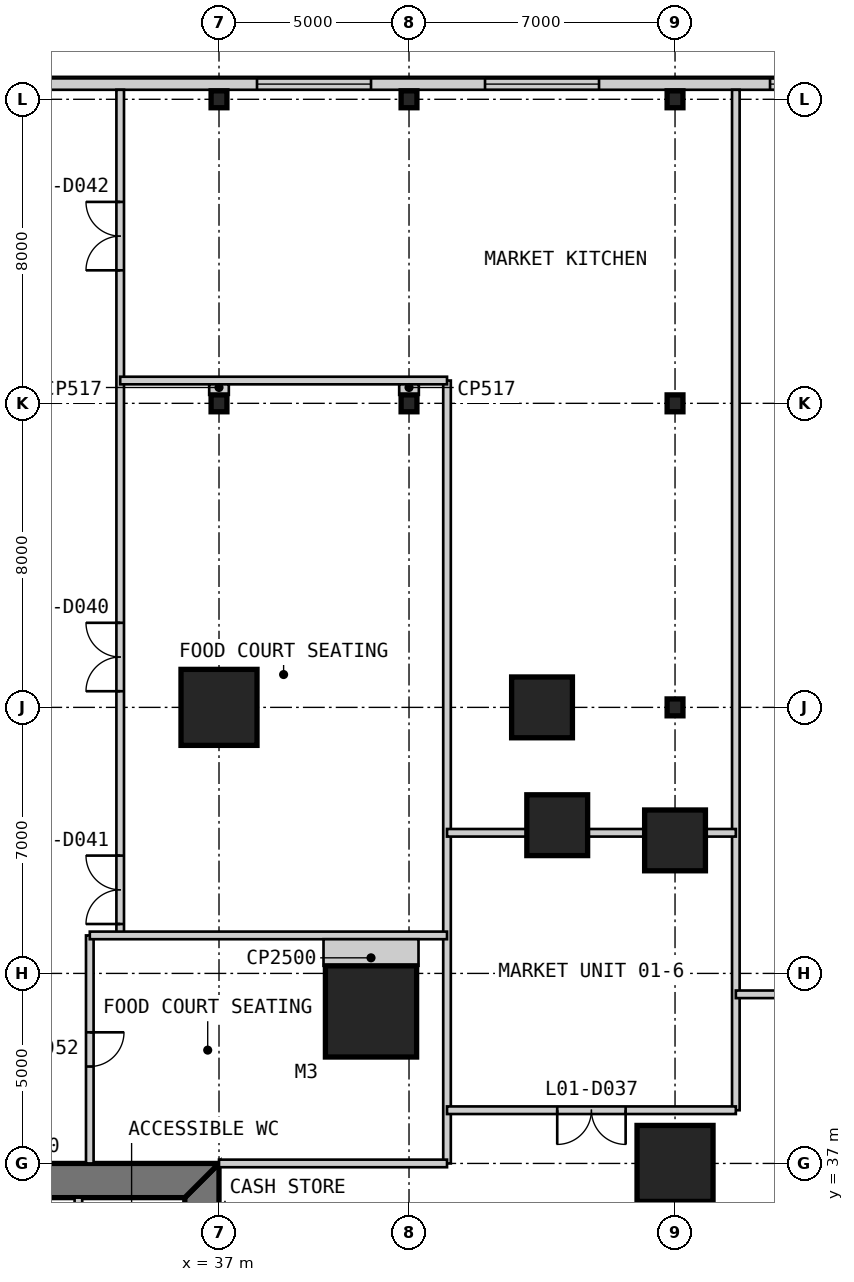
"""IFC4 building model, lengths in metres.
Left out: names, types, materials, properties, quantities, classifications, styles, units other than length and angle.
Written with IfcOpenShell. Run it as: python <this file> out.ifc"""

import sys

from ifc_helpers import new_model, si_unit, direction, frame, frame_2d, origin, origin_2d, place, context, subcontext, project, spatial, polyline, rectangle, i_section, outline, extrude, element, fill, save


model = new_model("IFC4")
c1 = context("Model", 3, precision=1e-05, world=origin(), true_north=direction((0.0, 1.0)))
c2 = subcontext(c1, "Body", "Model", "MODEL_VIEW")
j1 = project(units=[si_unit("LENGTHUNIT", "METRE"), si_unit("PLANEANGLEUNIT", "RADIAN")], contexts=[c1])
p1 = place(None, origin())
s1 = spatial("IfcSite", under=j1, at=p1, CompositionType="ELEMENT")
p2 = place(p1, origin())
s2 = spatial("IfcBuilding", under=s1, at=p2, CompositionType="ELEMENT")
p3 = place(p2, frame((0.0, 0.0, 7.0)))
s3 = spatial("IfcBuildingStorey", under=s2, at=p3, CompositionType="ELEMENT", Elevation=7.0)
p4 = place(p3, frame((41.0, 41.0, 0.0), z_axis=(0.0, 0.0, 1.0), x_axis=(1.0, 0.0, 0.0)))
e1 = element("IfcColumn", 1, at=p4, inside=s3, PredefinedType="COLUMN", context=c2, shape_type="SweptSolid", body=[
    extrude(rectangle(XDim=2.4, YDim=2.4, at=origin_2d()), origin(), (0.0, 0.0, 1.0), 4.8),
])
p5 = place(p3, frame((49.0, 37.0, 0.0), z_axis=(0.0, 0.0, 1.0), x_axis=(1.0, 0.0, 0.0)))
e2 = element("IfcColumn", 2, at=p5, inside=s3, PredefinedType="COLUMN", context=c2, shape_type="SweptSolid", body=[
    extrude(rectangle(XDim=2.0, YDim=2.0, at=origin_2d()), origin(), (0.0, 0.0, 1.0), 4.8),
])
for number, where, z_axis, x_axis in (
    (3, (49.0, 45.5, 0.0), (0.0, 0.0, 1.0), (1.0, 0.0, 0.0)),
    (4, (45.9, 45.9, 0.0), (0.0, 0.0, 1.0), (1.0, 0.0, 0.0)),
    (5, (45.5, 49.0, 0.0), (0.0, 0.0, 1.0), (1.0, 0.0, 0.0)),
):
    element("IfcColumn", number, at=place(p3, frame(where, z_axis=z_axis, x_axis=x_axis)), inside=s3, PredefinedType="COLUMN", context=c2, shape_type="SweptSolid", body=[
        extrude(rectangle(XDim=1.6, YDim=1.6, at=origin_2d()), origin(), (0.0, 0.0, 1.0), 4.8),
    ])
p6 = place(p3, frame((37.0, 49.0, 0.0), z_axis=(0.0, 0.0, 1.0), x_axis=(1.0, 0.0, 0.0)))
e6 = element("IfcColumn", 6, at=p6, inside=s3, PredefinedType="COLUMN", context=c2, shape_type="SweptSolid", body=[
    extrude(rectangle(XDim=2.0, YDim=2.0, at=origin_2d()), origin(), (0.0, 0.0, 1.0), 4.8),
])
for number, where, z_axis, x_axis in (
    (7, (37.0, 57.0, 0.0), (0.0, 0.0, 1.0), (1.0, 0.0, 0.0)),
    (8, (37.0, 65.0, 0.0), (0.0, 0.0, 1.0), (1.0, 0.0, 0.0)),
    (9, (42.0, 57.0, 0.0), (0.0, 0.0, 1.0), (1.0, 0.0, 0.0)),
    (10, (42.0, 65.0, 0.0), (0.0, 0.0, 1.0), (1.0, 0.0, 0.0)),
    (11, (49.0, 49.0, 0.0), (0.0, 0.0, 1.0), (1.0, 0.0, 0.0)),
    (12, (49.0, 57.0, 0.0), (0.0, 0.0, 1.0), (1.0, 0.0, 0.0)),
    (13, (49.0, 65.0, 0.0), (0.0, 0.0, 1.0), (1.0, 0.0, 0.0)),
):
    element("IfcColumn", number, at=place(p3, frame(where, z_axis=z_axis, x_axis=x_axis)), inside=s3, PredefinedType="COLUMN", context=c2, shape_type="SweptSolid", body=[
        extrude(i_section(OverallWidth=0.417, OverallDepth=0.445, WebThickness=0.039, FlangeThickness=0.063, at=origin_2d()), origin(), (0.0, 0.0, 1.0), 4.8),
    ])
p7 = place(p3, frame((36.55, 13.9, 0.0), z_axis=(0.0, 0.0, 1.0), x_axis=(0.0, 1.0, 0.0)))
e14 = element("IfcWall", 14, at=p7, inside=s3, PredefinedType="SHEAR", context=c2, shape_type="SweptSolid", body=[
    extrude(outline(polyline([(-0.9, -0.45), (23.1, -0.45), (22.2, 0.45), (0.0, 0.45), (-0.9, -0.45)])), origin(), (0.0, 0.0, 1.0), 4.8),
])
p8 = place(p7, frame((20.2, 0.0, 0.0)))
e15 = element("IfcOpeningElement", 15, at=p8, cuts=e14, PredefinedType="OPENING", context=c2, shape_type="SweptSolid", body=[
    extrude(rectangle(XDim=1.0, YDim=2.2, at=frame_2d((0.5, 1.1))), frame((0.0, 0.46, 0.0), z_axis=(0.0, -1.0, 0.0), x_axis=(1.0, 0.0, 0.0)), (0.0, 0.0, 1.0), 0.92),
])
p9 = place(p7, frame((17.25, 0.0, 0.0)))
e16 = element("IfcOpeningElement", 16, at=p9, cuts=e14, PredefinedType="OPENING", context=c2, shape_type="SweptSolid", body=[
    extrude(rectangle(XDim=0.9, YDim=2.2, at=frame_2d((0.45, 1.1))), frame((0.0, 0.46, 0.0), z_axis=(0.0, -1.0, 0.0), x_axis=(1.0, 0.0, 0.0)), (0.0, 0.0, 1.0), 0.92),
])
p10 = place(p3, frame((37.0, 36.55, 0.0), z_axis=(0.0, 0.0, 1.0), x_axis=(-1.0, 0.0, 0.0)))
e17 = element("IfcWall", 17, at=p10, inside=s3, PredefinedType="SHEAR", context=c2, shape_type="SweptSolid", body=[
    extrude(outline(polyline([(0.0, -0.45), (24.0, -0.45), (23.1, 0.45), (0.9, 0.45), (0.0, -0.45)])), origin(), (0.0, 0.0, 1.0), 4.8),
])
p11 = place(p10, frame((4.9, 0.0, 0.0)))
e18 = element("IfcOpeningElement", 18, at=p11, cuts=e17, PredefinedType="OPENING", context=c2, shape_type="SweptSolid", body=[
    extrude(rectangle(XDim=1.0, YDim=2.2, at=frame_2d((0.5, 1.1))), frame((0.0, 0.46, 0.0), z_axis=(0.0, -1.0, 0.0), x_axis=(1.0, 0.0, 0.0)), (0.0, 0.0, 1.0), 0.92),
])
p12 = place(p10, frame((8.9, 0.0, 0.0)))
e19 = element("IfcOpeningElement", 19, at=p12, cuts=e17, PredefinedType="OPENING", context=c2, shape_type="SweptSolid", body=[
    extrude(rectangle(XDim=1.1, YDim=2.2, at=frame_2d((0.55, 1.1))), frame((0.0, 0.46, 0.0), z_axis=(0.0, -1.0, 0.0), x_axis=(1.0, 0.0, 0.0)), (0.0, 0.0, 1.0), 0.92),
])
p13 = place(p10, frame((15.05, 0.0, 0.0)))
e20 = element("IfcOpeningElement", 20, at=p13, cuts=e17, PredefinedType="OPENING", context=c2, shape_type="SweptSolid", body=[
    extrude(rectangle(XDim=0.9, YDim=2.2, at=frame_2d((0.45, 1.1))), frame((0.0, 0.46, 0.0), z_axis=(0.0, -1.0, 0.0), x_axis=(1.0, 0.0, 0.0)), (0.0, 0.0, 1.0), 0.92),
])
p14 = place(p10, frame((17.9, 0.0, 0.0)))
e21 = element("IfcOpeningElement", 21, at=p14, cuts=e17, PredefinedType="OPENING", context=c2, shape_type="SweptSolid", body=[
    extrude(rectangle(XDim=1.0, YDim=2.2, at=frame_2d((0.5, 1.1))), frame((0.0, 0.46, 0.0), z_axis=(0.0, -1.0, 0.0), x_axis=(1.0, 0.0, 0.0)), (0.0, 0.0, 1.0), 0.92),
])
p15 = place(p10, frame((21.4, 0.0, 0.0)))
e22 = element("IfcOpeningElement", 22, at=p15, cuts=e17, PredefinedType="OPENING", context=c2, shape_type="SweptSolid", body=[
    extrude(rectangle(XDim=1.0, YDim=2.2, at=frame_2d((0.5, 1.1))), frame((0.0, 0.46, 0.0), z_axis=(0.0, -1.0, 0.0), x_axis=(1.0, 0.0, 0.0)), (0.0, 0.0, 1.0), 0.92),
])
p16 = place(p3, frame((65.55, 65.4, 0.0), z_axis=(0.0, 0.0, 1.0), x_axis=(-1.0, 0.0, 0.0)))
e23 = element("IfcWall", 23, at=p16, inside=s3, PredefinedType="SOLIDWALL", context=c2, shape_type="SweptSolid", body=[
    extrude(rectangle(XDim=81.1, YDim=0.3, at=frame_2d((40.55, 0.0))), origin(), (0.0, 0.0, 1.0), 4.5),
])
p17 = place(p16, frame((75.05, 0.0, 0.9)))
e24 = element("IfcOpeningElement", 24, at=p17, cuts=e23, PredefinedType="OPENING", context=c2, shape_type="SweptSolid", body=[
    extrude(rectangle(XDim=3.0, YDim=2.4, at=frame_2d((1.5, 1.2))), frame((0.0, 0.16, 0.0), z_axis=(0.0, -1.0, 0.0), x_axis=(1.0, 0.0, 0.0)), (0.0, 0.0, 1.0), 0.32),
])
p18 = place(p16, frame((67.05, 0.0, 0.9)))
e25 = element("IfcOpeningElement", 25, at=p18, cuts=e23, PredefinedType="OPENING", context=c2, shape_type="SweptSolid", body=[
    extrude(rectangle(XDim=3.0, YDim=2.4, at=frame_2d((1.5, 1.2))), frame((0.0, 0.16, 0.0), z_axis=(0.0, -1.0, 0.0), x_axis=(1.0, 0.0, 0.0)), (0.0, 0.0, 1.0), 0.32),
])
p19 = place(p16, frame((59.05, 0.0, 0.9)))
e26 = element("IfcOpeningElement", 26, at=p19, cuts=e23, PredefinedType="OPENING", context=c2, shape_type="SweptSolid", body=[
    extrude(rectangle(XDim=3.0, YDim=2.4, at=frame_2d((1.5, 1.2))), frame((0.0, 0.16, 0.0), z_axis=(0.0, -1.0, 0.0), x_axis=(1.0, 0.0, 0.0)), (0.0, 0.0, 1.0), 0.32),
])
p20 = place(p16, frame((45.05, 0.0, 0.9)))
e27 = element("IfcOpeningElement", 27, at=p20, cuts=e23, PredefinedType="OPENING", context=c2, shape_type="SweptSolid", body=[
    extrude(rectangle(XDim=3.0, YDim=2.4, at=frame_2d((1.5, 1.2))), frame((0.0, 0.16, 0.0), z_axis=(0.0, -1.0, 0.0), x_axis=(1.0, 0.0, 0.0)), (0.0, 0.0, 1.0), 0.32),
])
p21 = place(p16, frame((33.05, 0.0, 0.9)))
e28 = element("IfcOpeningElement", 28, at=p21, cuts=e23, PredefinedType="OPENING", context=c2, shape_type="SweptSolid", body=[
    extrude(rectangle(XDim=3.0, YDim=2.4, at=frame_2d((1.5, 1.2))), frame((0.0, 0.16, 0.0), z_axis=(0.0, -1.0, 0.0), x_axis=(1.0, 0.0, 0.0)), (0.0, 0.0, 1.0), 0.32),
])
p22 = place(p16, frame((24.55, 0.0, 0.9)))
e29 = element("IfcOpeningElement", 29, at=p22, cuts=e23, PredefinedType="OPENING", context=c2, shape_type="SweptSolid", body=[
    extrude(rectangle(XDim=3.0, YDim=2.4, at=frame_2d((1.5, 1.2))), frame((0.0, 0.16, 0.0), z_axis=(0.0, -1.0, 0.0), x_axis=(1.0, 0.0, 0.0)), (0.0, 0.0, 1.0), 0.32),
])
p23 = place(p16, frame((18.55, 0.0, 0.9)))
e30 = element("IfcOpeningElement", 30, at=p23, cuts=e23, PredefinedType="OPENING", context=c2, shape_type="SweptSolid", body=[
    extrude(rectangle(XDim=3.0, YDim=2.4, at=frame_2d((1.5, 1.2))), frame((0.0, 0.16, 0.0), z_axis=(0.0, -1.0, 0.0), x_axis=(1.0, 0.0, 0.0)), (0.0, 0.0, 1.0), 0.32),
])
p24 = place(p16, frame((11.05, 0.0, 0.9)))
e31 = element("IfcOpeningElement", 31, at=p24, cuts=e23, PredefinedType="OPENING", context=c2, shape_type="SweptSolid", body=[
    extrude(rectangle(XDim=3.0, YDim=2.4, at=frame_2d((1.5, 1.2))), frame((0.0, 0.16, 0.0), z_axis=(0.0, -1.0, 0.0), x_axis=(1.0, 0.0, 0.0)), (0.0, 0.0, 1.0), 0.32),
])
p25 = place(p16, frame((3.05, 0.0, 0.9)))
e32 = element("IfcOpeningElement", 32, at=p25, cuts=e23, PredefinedType="OPENING", context=c2, shape_type="SweptSolid", body=[
    extrude(rectangle(XDim=3.0, YDim=2.4, at=frame_2d((1.5, 1.2))), frame((0.0, 0.16, 0.0), z_axis=(0.0, -1.0, 0.0), x_axis=(1.0, 0.0, 0.0)), (0.0, 0.0, 1.0), 0.32),
])
p26 = place(p3, frame((33.3, 36.1, 0.0), z_axis=(0.0, 0.0, 1.0), x_axis=(0.0, -1.0, 0.0)))
e33 = element("IfcWall", 33, at=p26, inside=s3, PredefinedType="PARTITIONING", context=c2, shape_type="SweptSolid", body=[
    extrude(rectangle(XDim=16.1, YDim=0.2, at=frame_2d((8.05, 0.0))), origin(), (0.0, 0.0, 1.0), 4.6),
])
p27 = place(p26, frame((4.1, 0.0, 0.0)))
e34 = element("IfcOpeningElement", 34, at=p27, cuts=e33, PredefinedType="OPENING", context=c2, shape_type="SweptSolid", body=[
    extrude(rectangle(XDim=0.9, YDim=2.2, at=frame_2d((0.45, 1.1))), frame((0.0, 0.11, 0.0), z_axis=(0.0, -1.0, 0.0), x_axis=(1.0, 0.0, 0.0)), (0.0, 0.0, 1.0), 0.22),
])
p28 = place(p3, frame((33.6, 37.0, 0.0), z_axis=(0.0, 0.0, 1.0), x_axis=(0.0, 1.0, 0.0)))
e35 = element("IfcWall", 35, at=p28, inside=s3, PredefinedType="PARTITIONING", context=c2, shape_type="SweptSolid", body=[
    extrude(rectangle(XDim=6.0, YDim=0.2, at=frame_2d((3.0, 0.0))), origin(), (0.0, 0.0, 1.0), 4.5),
])
p29 = place(p28, frame((2.55, 0.0, 0.0)))
e36 = element("IfcOpeningElement", 36, at=p29, cuts=e35, PredefinedType="OPENING", context=c2, shape_type="SweptSolid", body=[
    extrude(rectangle(XDim=0.9, YDim=2.2, at=frame_2d((0.45, 1.1))), frame((0.0, 0.11, 0.0), z_axis=(0.0, -1.0, 0.0), x_axis=(1.0, 0.0, 0.0)), (0.0, 0.0, 1.0), 0.22),
])
p30 = place(p3, frame((34.4, 43.0, 0.0), z_axis=(0.0, 0.0, 1.0), x_axis=(0.0, 1.0, 0.0)))
e37 = element("IfcWall", 37, at=p30, inside=s3, PredefinedType="PARTITIONING", context=c2, shape_type="SweptSolid", body=[
    extrude(rectangle(XDim=22.25, YDim=0.2, at=frame_2d((11.125, 0.0))), origin(), (0.0, 0.0, 1.0), 4.5),
])
p31 = place(p30, frame((6.425, 0.0, 0.0)))
e38 = element("IfcOpeningElement", 38, at=p31, cuts=e37, PredefinedType="OPENING", context=c2, shape_type="SweptSolid", body=[
    extrude(rectangle(XDim=1.8, YDim=2.4, at=frame_2d((0.9, 1.2))), frame((0.0, 0.11, 0.0), z_axis=(0.0, -1.0, 0.0), x_axis=(1.0, 0.0, 0.0)), (0.0, 0.0, 1.0), 0.22),
])
p32 = place(p30, frame((0.3, 0.0, 0.0)))
e39 = element("IfcOpeningElement", 39, at=p32, cuts=e37, PredefinedType="OPENING", context=c2, shape_type="SweptSolid", body=[
    extrude(rectangle(XDim=1.8, YDim=2.4, at=frame_2d((0.9, 1.2))), frame((0.0, 0.11, 0.0), z_axis=(0.0, -1.0, 0.0), x_axis=(1.0, 0.0, 0.0)), (0.0, 0.0, 1.0), 0.22),
])
p33 = place(p30, frame((17.5, 0.0, 0.0)))
e40 = element("IfcOpeningElement", 40, at=p33, cuts=e37, PredefinedType="OPENING", context=c2, shape_type="SweptSolid", body=[
    extrude(rectangle(XDim=1.8, YDim=2.4, at=frame_2d((0.9, 1.2))), frame((0.0, 0.11, 0.0), z_axis=(0.0, -1.0, 0.0), x_axis=(1.0, 0.0, 0.0)), (0.0, 0.0, 1.0), 0.22),
])
p34 = place(p3, frame((43.0, 37.0, 0.0), z_axis=(0.0, 0.0, 1.0), x_axis=(0.0, 1.0, 0.0)))
e41 = element("IfcWall", 41, at=p34, inside=s3, PredefinedType="PARTITIONING", context=c2, shape_type="SweptSolid", body=[
    extrude(rectangle(XDim=20.6, YDim=0.2, at=frame_2d((10.3, 0.0))), origin(), (0.0, 0.0, 1.0), 4.5),
])
p35 = place(p3, frame((50.6, 38.4, 0.0), z_axis=(0.0, 0.0, 1.0), x_axis=(0.0, 1.0, 0.0)))
e42 = element("IfcWall", 42, at=p35, inside=s3, PredefinedType="PARTITIONING", context=c2, shape_type="SweptSolid", body=[
    extrude(rectangle(XDim=26.85, YDim=0.2, at=frame_2d((13.425, 0.0))), origin(), (0.0, 0.0, 1.0), 4.5),
])
p36 = place(p3, frame((37.0, 37.0, 0.0), z_axis=(0.0, 0.0, 1.0), x_axis=(1.0, 0.0, 0.0)))
e43 = element("IfcWall", 43, at=p36, inside=s3, PredefinedType="PARTITIONING", context=c2, shape_type="SweptSolid", body=[
    extrude(rectangle(XDim=6.0, YDim=0.2, at=frame_2d((3.0, 0.0))), origin(), (0.0, 0.0, 1.0), 3.653),
])
p37 = place(p3, frame((43.0, 38.4, 0.0), z_axis=(0.0, 0.0, 1.0), x_axis=(1.0, 0.0, 0.0)))
e44 = element("IfcWall", 44, at=p37, inside=s3, PredefinedType="PARTITIONING", context=c2, shape_type="SweptSolid", body=[
    extrude(rectangle(XDim=7.6, YDim=0.2, at=frame_2d((3.8, 0.0))), origin(), (0.0, 0.0, 1.0), 4.5),
])
p38 = place(p37, frame((2.9, 0.0, 0.0)))
e45 = element("IfcOpeningElement", 45, at=p38, cuts=e44, PredefinedType="OPENING", context=c2, shape_type="SweptSolid", body=[
    extrude(rectangle(XDim=1.8, YDim=2.4, at=frame_2d((0.9, 1.2))), frame((0.0, 0.11, 0.0), z_axis=(0.0, -1.0, 0.0), x_axis=(1.0, 0.0, 0.0)), (0.0, 0.0, 1.0), 0.22),
])
p39 = place(p3, frame((50.6, 41.45, 0.0), z_axis=(0.0, 0.0, 1.0), x_axis=(1.0, 0.0, 0.0)))
e46 = element("IfcWall", 46, at=p39, inside=s3, PredefinedType="PARTITIONING", context=c2, shape_type="SweptSolid", body=[
    extrude(rectangle(XDim=14.65, YDim=0.2, at=frame_2d((7.325, 0.0))), origin(), (0.0, 0.0, 1.0), 4.5),
])
p40 = place(p39, frame((2.55, 0.0, 0.0)))
e47 = element("IfcOpeningElement", 47, at=p40, cuts=e46, PredefinedType="OPENING", context=c2, shape_type="SweptSolid", body=[
    extrude(rectangle(XDim=1.8, YDim=2.4, at=frame_2d((0.9, 1.2))), frame((0.0, 0.11, 0.0), z_axis=(0.0, -1.0, 0.0), x_axis=(1.0, 0.0, 0.0)), (0.0, 0.0, 1.0), 0.22),
])
p41 = place(p39, frame((9.825, 0.0, 0.0)))
e48 = element("IfcOpeningElement", 48, at=p41, cuts=e46, PredefinedType="OPENING", context=c2, shape_type="SweptSolid", body=[
    extrude(rectangle(XDim=1.8, YDim=2.4, at=frame_2d((0.9, 1.2))), frame((0.0, 0.11, 0.0), z_axis=(0.0, -1.0, 0.0), x_axis=(1.0, 0.0, 0.0)), (0.0, 0.0, 1.0), 0.22),
])
p42 = place(p3, frame((33.6, 43.0, 0.0), z_axis=(0.0, 0.0, 1.0), x_axis=(1.0, 0.0, 0.0)))
e49 = element("IfcWall", 49, at=p42, inside=s3, PredefinedType="PARTITIONING", context=c2, shape_type="SweptSolid", body=[
    extrude(rectangle(XDim=9.4, YDim=0.2, at=frame_2d((4.7, 0.0))), origin(), (0.0, 0.0, 1.0), 4.5),
])
p43 = place(p3, frame((43.0, 45.7, 0.0), z_axis=(0.0, 0.0, 1.0), x_axis=(1.0, 0.0, 0.0)))
e50 = element("IfcWall", 50, at=p43, inside=s3, PredefinedType="PARTITIONING", context=c2, shape_type="SweptSolid", body=[
    extrude(rectangle(XDim=2.1, YDim=0.2, at=frame_2d((1.05, 0.0))), origin(), (0.0, 0.0, 1.0), 4.5),
])
p44 = place(p3, frame((46.7, 45.7, 0.0), z_axis=(0.0, 0.0, 1.0), x_axis=(1.0, 0.0, 0.0)))
e51 = element("IfcWall", 51, at=p44, inside=s3, PredefinedType="PARTITIONING", context=c2, shape_type="SweptSolid", body=[
    extrude(rectangle(XDim=1.5, YDim=0.2, at=frame_2d((0.75, 0.0))), origin(), (0.0, 0.0, 1.0), 3.65),
])
p45 = place(p3, frame((49.8, 45.7, 0.0), z_axis=(0.0, 0.0, 1.0), x_axis=(1.0, 0.0, 0.0)))
e52 = element("IfcWall", 52, at=p45, inside=s3, PredefinedType="PARTITIONING", context=c2, shape_type="SweptSolid", body=[
    extrude(rectangle(XDim=0.8, YDim=0.2, at=frame_2d((0.4, 0.0))), origin(), (0.0, 0.0, 1.0), 4.5),
])
p46 = place(p3, frame((34.4, 57.6, 0.0), z_axis=(0.0, 0.0, 1.0), x_axis=(1.0, 0.0, 0.0)))
e53 = element("IfcWall", 53, at=p46, inside=s3, PredefinedType="PARTITIONING", context=c2, shape_type="SweptSolid", body=[
    extrude(rectangle(XDim=8.6, YDim=0.2, at=frame_2d((4.3, 0.0))), origin(), (0.0, 0.0, 1.0), 4.5),
])
for number, where, z_axis, x_axis in (
    (54, (37.0, 57.5, 0.0), (0.0, 0.0, 1.0), (0.0, -1.0, 0.0)),
    (55, (42.0, 57.5, 0.0), (0.0, 0.0, 1.0), (0.0, -1.0, 0.0)),
):
    element("IfcWall", number, at=place(p3, frame(where, z_axis=z_axis, x_axis=x_axis)), inside=s3, PredefinedType="PARTITIONING", context=c2, shape_type="SweptSolid", body=[
        extrude(rectangle(XDim=0.278, YDim=0.517, at=frame_2d((0.139, 0.0))), origin(), (0.0, 0.0, 1.0), 4.5),
    ])
p47 = place(p3, frame((41.0, 42.9, 0.0), z_axis=(0.0, 0.0, 1.0), x_axis=(0.0, -1.0, 0.0)))
e56 = element("IfcWall", 56, at=p47, inside=s3, PredefinedType="PARTITIONING", context=c2, shape_type="SweptSolid", body=[
    extrude(rectangle(XDim=0.7, YDim=2.5, at=frame_2d((0.35, 0.0))), origin(), (0.0, 0.0, 1.0), 4.5),
])
p48 = place(p22, origin())
e57 = element("IfcWindow", 57, at=p48, inside=s3, PartitioningType="SINGLE_PANEL", PredefinedType="WINDOW", context=c2, shape_type="SweptSolid", body=[
    extrude(rectangle(XDim=3.0, YDim=2.4, at=frame_2d((1.5, 1.2))), frame((0.0, 0.03, 0.0), z_axis=(0.0, -1.0, 0.0), x_axis=(1.0, 0.0, 0.0)), (0.0, 0.0, 1.0), 0.06),
])
fill(e29, e57)
p49 = place(p23, origin())
e58 = element("IfcWindow", 58, at=p49, inside=s3, PartitioningType="SINGLE_PANEL", PredefinedType="WINDOW", context=c2, shape_type="SweptSolid", body=[
    extrude(rectangle(XDim=3.0, YDim=2.4, at=frame_2d((1.5, 1.2))), frame((0.0, 0.03, 0.0), z_axis=(0.0, -1.0, 0.0), x_axis=(1.0, 0.0, 0.0)), (0.0, 0.0, 1.0), 0.06),
])
fill(e30, e58)
p50 = place(p24, origin())
e59 = element("IfcWindow", 59, at=p50, inside=s3, PartitioningType="SINGLE_PANEL", PredefinedType="WINDOW", context=c2, shape_type="SweptSolid", body=[
    extrude(rectangle(XDim=3.0, YDim=2.4, at=frame_2d((1.5, 1.2))), frame((0.0, 0.03, 0.0), z_axis=(0.0, -1.0, 0.0), x_axis=(1.0, 0.0, 0.0)), (0.0, 0.0, 1.0), 0.06),
])
fill(e31, e59)
p51 = place(p38, frame((1.8, 0.0, 0.0), z_axis=(0.0, 0.0, 1.0), x_axis=(-1.0, 0.0, 0.0)))
e60 = element("IfcDoor", 60, at=p51, inside=s3, OperationType="DOUBLE_DOOR_SINGLE_SWING", PredefinedType="DOOR", context=c2, shape_type="SweptSolid", body=[
    extrude(rectangle(XDim=1.8, YDim=2.4, at=frame_2d((0.9, 1.2))), frame((0.0, 0.025, 0.0), z_axis=(0.0, -1.0, 0.0), x_axis=(1.0, 0.0, 0.0)), (0.0, 0.0, 1.0), 0.05),
])
fill(e45, e60)
p52 = place(p31, origin())
e61 = element("IfcDoor", 61, at=p52, inside=s3, OperationType="DOUBLE_DOOR_SINGLE_SWING", PredefinedType="DOOR", context=c2, shape_type="SweptSolid", body=[
    extrude(rectangle(XDim=1.8, YDim=2.4, at=frame_2d((0.9, 1.2))), frame((0.0, 0.025, 0.0), z_axis=(0.0, -1.0, 0.0), x_axis=(1.0, 0.0, 0.0)), (0.0, 0.0, 1.0), 0.05),
])
fill(e38, e61)
p53 = place(p32, origin())
e62 = element("IfcDoor", 62, at=p53, inside=s3, OperationType="DOUBLE_DOOR_SINGLE_SWING", PredefinedType="DOOR", context=c2, shape_type="SweptSolid", body=[
    extrude(rectangle(XDim=1.8, YDim=2.4, at=frame_2d((0.9, 1.2))), frame((0.0, 0.025, 0.0), z_axis=(0.0, -1.0, 0.0), x_axis=(1.0, 0.0, 0.0)), (0.0, 0.0, 1.0), 0.05),
])
fill(e39, e62)
p54 = place(p33, origin())
e63 = element("IfcDoor", 63, at=p54, inside=s3, OperationType="DOUBLE_DOOR_SINGLE_SWING", PredefinedType="DOOR", context=c2, shape_type="SweptSolid", body=[
    extrude(rectangle(XDim=1.8, YDim=2.4, at=frame_2d((0.9, 1.2))), frame((0.0, 0.025, 0.0), z_axis=(0.0, -1.0, 0.0), x_axis=(1.0, 0.0, 0.0)), (0.0, 0.0, 1.0), 0.05),
])
fill(e40, e63)
p55 = place(p29, frame((0.9, 0.0, 0.0), z_axis=(0.0, 0.0, 1.0), x_axis=(-1.0, 0.0, 0.0)))
e64 = element("IfcDoor", 64, at=p55, inside=s3, OperationType="SINGLE_SWING_LEFT", PredefinedType="DOOR", context=c2, shape_type="SweptSolid", body=[
    extrude(rectangle(XDim=0.9, YDim=2.2, at=frame_2d((0.45, 1.1))), frame((0.0, 0.025, 0.0), z_axis=(0.0, -1.0, 0.0), x_axis=(1.0, 0.0, 0.0)), (0.0, 0.0, 1.0), 0.05),
])
fill(e36, e64)
save(model, sys.argv[1])
